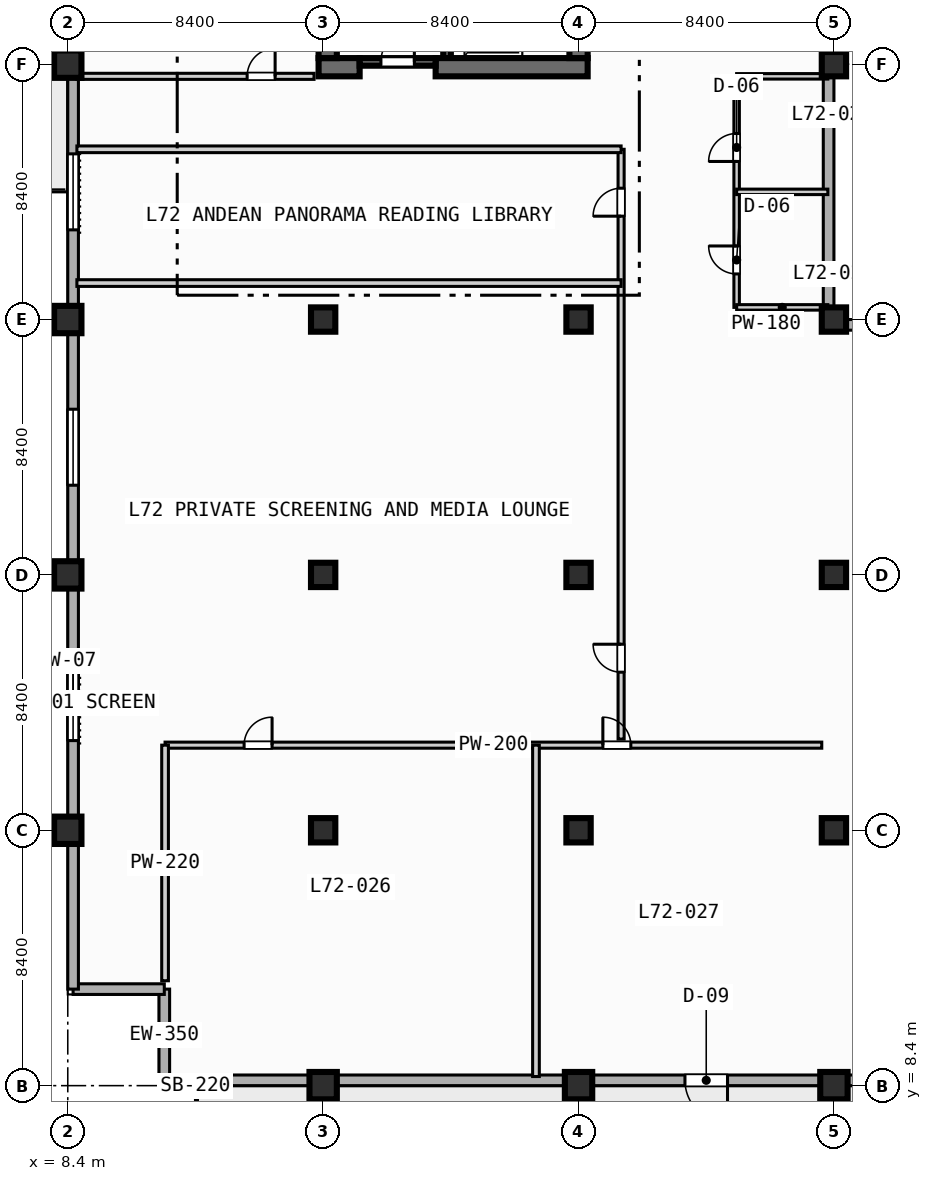
"""IFC4 building model, lengths in metres.
Left out: names, types, materials, properties, quantities, classifications, styles, units other than length and angle.
Written with IfcOpenShell. Run it as: python <this file> out.ifc"""

import sys

from ifc_helpers import new_model, si_unit, direction, frame, frame_2d, origin, origin_2d, place, context, subcontext, project, spatial, rectangle, extrude, element, fill, save


model = new_model("IFC4")
c1 = context("Model", 3, precision=1e-05, world=origin(), true_north=direction((0.0, 1.0)))
c2 = subcontext(c1, "Body", "Model", "MODEL_VIEW")
j1 = project(units=[si_unit("LENGTHUNIT", "METRE"), si_unit("PLANEANGLEUNIT", "RADIAN")], contexts=[c1])
p1 = place(None, origin())
s1 = spatial("IfcSite", under=j1, at=p1, CompositionType="ELEMENT")
p2 = place(p1, origin())
s2 = spatial("IfcBuilding", under=s1, at=p2, CompositionType="ELEMENT")
p3 = place(p2, frame((0.0, 0.0, 290.4)))
s3 = spatial("IfcBuildingStorey", under=s2, at=p3, CompositionType="ELEMENT", Elevation=290.4)
p4 = place(p3, frame((20.875, 42.2, 0.0), z_axis=(0.0, 0.0, 1.0), x_axis=(0.0, 1.0, 0.0)))
e1 = element("IfcWall", 1, at=p4, inside=s3, PredefinedType="SOLIDWALL", context=c2, shape_type="SweptSolid", body=[
    extrude(rectangle(XDim=8.05, YDim=0.25, at=frame_2d((4.025, 0.0))), origin(), (0.0, 0.0, 1.0), 4.05),
])
p5 = place(p3, frame((16.65, 41.9, 0.0), z_axis=(0.0, 0.0, 1.0), x_axis=(1.0, 0.0, 0.0)))
e2 = element("IfcWall", 2, at=p5, inside=s3, PredefinedType="SHEAR", context=c2, shape_type="SweptSolid", body=[
    extrude(rectangle(XDim=1.35, YDim=0.6, at=frame_2d((0.675, 0.0))), origin(), (0.0, 0.0, 1.0), 4.05),
])
p6 = place(p3, frame((20.5, 41.9, 0.0), z_axis=(0.0, 0.0, 1.0), x_axis=(1.0, 0.0, 0.0)))
e3 = element("IfcWall", 3, at=p6, inside=s3, PredefinedType="SHEAR", context=c2, shape_type="SweptSolid", body=[
    extrude(rectangle(XDim=5.0, YDim=0.6, at=frame_2d((2.5, 0.0))), origin(), (0.0, 0.0, 1.0), 4.05),
])
p7 = place(p3, frame((16.95, 42.2, 0.0), z_axis=(0.0, 0.0, 1.0), x_axis=(0.0, 1.0, 0.0)))
e4 = element("IfcWall", 4, at=p7, inside=s3, PredefinedType="SHEAR", context=c2, shape_type="SweptSolid", body=[
    extrude(rectangle(XDim=16.35, YDim=0.6, at=frame_2d((8.175, 0.0))), origin(), (0.0, 0.0, 1.0), 4.05),
])
p8 = place(p3, frame((25.2, 42.2, 0.0), z_axis=(0.0, 0.0, 1.0), x_axis=(0.0, 1.0, 0.0)))
e5 = element("IfcWall", 5, at=p8, inside=s3, PredefinedType="SHEAR", context=c2, shape_type="SweptSolid", body=[
    extrude(rectangle(XDim=8.6, YDim=0.6, at=frame_2d((4.3, 0.0))), origin(), (0.0, 0.0, 1.0), 4.05),
])
for number, where, z_axis, x_axis in (
    (6, (8.4, 16.8, 0.0), (0.0, 0.0, 1.0), (1.0, 0.0, 0.0)),
    (7, (8.4, 25.2, 0.0), (0.0, 0.0, 1.0), (1.0, 0.0, 0.0)),
    (8, (8.4, 33.6, 0.0), (0.0, 0.0, 1.0), (1.0, 0.0, 0.0)),
    (9, (8.4, 42.0, 0.0), (0.0, 0.0, 1.0), (1.0, 0.0, 0.0)),
    (10, (16.8, 8.4, 0.0), (0.0, 0.0, 1.0), (1.0, 0.0, 0.0)),
):
    element("IfcColumn", number, at=place(p3, frame(where, z_axis=z_axis, x_axis=x_axis)), inside=s3, PredefinedType="COLUMN", context=c2, shape_type="SweptSolid", body=[
        extrude(rectangle(XDim=0.9, YDim=0.9, at=origin_2d()), origin(), (0.0, 0.0, 1.0), 4.4),
    ])
for number, where, z_axis, x_axis in (
    (11, (16.8, 16.8, 0.0), (0.0, 0.0, 1.0), (1.0, 0.0, 0.0)),
    (12, (16.8, 25.2, 0.0), (0.0, 0.0, 1.0), (1.0, 0.0, 0.0)),
    (13, (16.8, 33.6, 0.0), (0.0, 0.0, 1.0), (1.0, 0.0, 0.0)),
):
    element("IfcColumn", number, at=place(p3, frame(where, z_axis=z_axis, x_axis=x_axis)), inside=s3, PredefinedType="COLUMN", context=c2, shape_type="SweptSolid", body=[
        extrude(rectangle(XDim=0.8, YDim=0.8, at=origin_2d()), origin(), (0.0, 0.0, 1.0), 4.4),
    ])
p9 = place(p3, frame((25.2, 8.4, 0.0), z_axis=(0.0, 0.0, 1.0), x_axis=(1.0, 0.0, 0.0)))
e14 = element("IfcColumn", 14, at=p9, inside=s3, PredefinedType="COLUMN", context=c2, shape_type="SweptSolid", body=[
    extrude(rectangle(XDim=0.9, YDim=0.9, at=origin_2d()), origin(), (0.0, 0.0, 1.0), 4.4),
])
for number, where, z_axis, x_axis in (
    (15, (25.2, 16.8, 0.0), (0.0, 0.0, 1.0), (1.0, 0.0, 0.0)),
    (16, (25.2, 25.2, 0.0), (0.0, 0.0, 1.0), (1.0, 0.0, 0.0)),
    (17, (25.2, 33.6, 0.0), (0.0, 0.0, 1.0), (1.0, 0.0, 0.0)),
):
    element("IfcColumn", number, at=place(p3, frame(where, z_axis=z_axis, x_axis=x_axis)), inside=s3, PredefinedType="COLUMN", context=c2, shape_type="SweptSolid", body=[
        extrude(rectangle(XDim=0.8, YDim=0.8, at=origin_2d()), origin(), (0.0, 0.0, 1.0), 4.4),
    ])
p10 = place(p3, frame((33.6, 8.4, 0.0), z_axis=(0.0, 0.0, 1.0), x_axis=(1.0, 0.0, 0.0)))
e18 = element("IfcColumn", 18, at=p10, inside=s3, PredefinedType="COLUMN", context=c2, shape_type="SweptSolid", body=[
    extrude(rectangle(XDim=0.9, YDim=0.9, at=origin_2d()), origin(), (0.0, 0.0, 1.0), 4.4),
])
for number, where, z_axis, x_axis in (
    (19, (33.6, 16.8, 0.0), (0.0, 0.0, 1.0), (1.0, 0.0, 0.0)),
    (20, (33.6, 25.2, 0.0), (0.0, 0.0, 1.0), (1.0, 0.0, 0.0)),
    (21, (33.6, 33.6, 0.0), (0.0, 0.0, 1.0), (1.0, 0.0, 0.0)),
    (22, (33.6, 42.0, 0.0), (0.0, 0.0, 1.0), (1.0, 0.0, 0.0)),
):
    element("IfcColumn", number, at=place(p3, frame(where, z_axis=z_axis, x_axis=x_axis)), inside=s3, PredefinedType="COLUMN", context=c2, shape_type="SweptSolid", body=[
        extrude(rectangle(XDim=0.8, YDim=0.8, at=origin_2d()), origin(), (0.0, 0.0, 1.0), 4.4),
    ])
for number, where, z_axis, x_axis in (
    (23, (11.575, 8.575, 0.0), (0.0, 0.0, 1.0), (0.0, 1.0, 0.0)),
    (24, (11.575, 11.575, 0.0), (0.0, 0.0, 1.0), (-1.0, 0.0, 0.0)),
):
    element("IfcWall", number, at=place(p3, frame(where, z_axis=z_axis, x_axis=x_axis)), inside=s3, PredefinedType="STANDARD", context=c2, shape_type="SweptSolid", body=[
        extrude(rectangle(XDim=3.0, YDim=0.35, at=frame_2d((1.5, 0.0))), origin(), (0.0, 0.0, 1.0), 4.05),
    ])
p11 = place(p3, frame((8.575, 11.575, 0.0), z_axis=(0.0, 0.0, 1.0), x_axis=(0.0, 1.0, 0.0)))
e25 = element("IfcWall", 25, at=p11, inside=s3, PredefinedType="STANDARD", context=c2, shape_type="SweptSolid", body=[
    extrude(rectangle(XDim=60.85, YDim=0.35, at=frame_2d((30.425, 0.0))), origin(), (0.0, 0.0, 1.0), 4.05),
])
p12 = place(p11, frame((33.925, 0.0, 0.0)))
e26 = element("IfcOpeningElement", 26, at=p12, cuts=e25, PredefinedType="OPENING", context=c2, shape_type="SweptSolid", body=[
    extrude(rectangle(XDim=1.4, YDim=2.2, at=frame_2d((0.7, 1.1))), frame((0.0, 0.185, 0.0), z_axis=(0.0, -1.0, 0.0), x_axis=(1.0, 0.0, 0.0)), (0.0, 0.0, 1.0), 0.37),
])
p13 = place(p11, frame((8.175, 0.0, 0.85)))
e27 = element("IfcOpeningElement", 27, at=p13, cuts=e25, PredefinedType="OPENING", context=c2, shape_type="SweptSolid", body=[
    extrude(rectangle(XDim=2.5, YDim=2.2, at=frame_2d((1.25, 1.1))), frame((0.0, 0.185, 0.0), z_axis=(0.0, -1.0, 0.0), x_axis=(1.0, 0.0, 0.0)), (0.0, 0.0, 1.0), 0.37),
])
p14 = place(p11, frame((16.575, 0.0, 0.85)))
e28 = element("IfcOpeningElement", 28, at=p14, cuts=e25, PredefinedType="OPENING", context=c2, shape_type="SweptSolid", body=[
    extrude(rectangle(XDim=2.5, YDim=2.2, at=frame_2d((1.25, 1.1))), frame((0.0, 0.185, 0.0), z_axis=(0.0, -1.0, 0.0), x_axis=(1.0, 0.0, 0.0)), (0.0, 0.0, 1.0), 0.37),
])
p15 = place(p11, frame((24.975, 0.0, 0.85)))
e29 = element("IfcOpeningElement", 29, at=p15, cuts=e25, PredefinedType="OPENING", context=c2, shape_type="SweptSolid", body=[
    extrude(rectangle(XDim=2.5, YDim=2.2, at=frame_2d((1.25, 1.1))), frame((0.0, 0.185, 0.0), z_axis=(0.0, -1.0, 0.0), x_axis=(1.0, 0.0, 0.0)), (0.0, 0.0, 1.0), 0.37),
])
p16 = place(p11, frame((41.775, 0.0, 0.85)))
e30 = element("IfcOpeningElement", 30, at=p16, cuts=e25, PredefinedType="OPENING", context=c2, shape_type="SweptSolid", body=[
    extrude(rectangle(XDim=2.5, YDim=2.2, at=frame_2d((1.25, 1.1))), frame((0.0, 0.185, 0.0), z_axis=(0.0, -1.0, 0.0), x_axis=(1.0, 0.0, 0.0)), (0.0, 0.0, 1.0), 0.37),
])
p17 = place(p3, frame((33.425, 72.425, 0.0), z_axis=(0.0, 0.0, 1.0), x_axis=(0.0, -1.0, 0.0)))
e31 = element("IfcWall", 31, at=p17, inside=s3, PredefinedType="STANDARD", context=c2, shape_type="SweptSolid", body=[
    extrude(rectangle(XDim=39.0, YDim=0.35, at=frame_2d((19.5, 0.0))), origin(), (0.0, 0.0, 1.0), 4.05),
])
p18 = place(p3, frame((33.425, 33.425, 0.0), z_axis=(0.0, 0.0, 1.0), x_axis=(1.0, 0.0, 0.0)))
e32 = element("IfcWall", 32, at=p18, inside=s3, PredefinedType="STANDARD", context=c2, shape_type="SweptSolid", body=[
    extrude(rectangle(XDim=30.6, YDim=0.35, at=frame_2d((15.3, 0.0))), origin(), (0.0, 0.0, 1.0), 4.05),
])
p19 = place(p18, frame((12.075, 0.0, 0.0)))
e33 = element("IfcOpeningElement", 33, at=p19, cuts=e32, PredefinedType="OPENING", context=c2, shape_type="SweptSolid", body=[
    extrude(rectangle(XDim=1.4, YDim=2.2, at=frame_2d((0.7, 1.1))), frame((0.0, 0.185, 0.0), z_axis=(0.0, -1.0, 0.0), x_axis=(1.0, 0.0, 0.0)), (0.0, 0.0, 1.0), 0.37),
])
p20 = place(p3, frame((64.025, 8.575, 0.0), z_axis=(0.0, 0.0, 1.0), x_axis=(-1.0, 0.0, 0.0)))
e34 = element("IfcWall", 34, at=p20, inside=s3, PredefinedType="STANDARD", context=c2, shape_type="SweptSolid", body=[
    extrude(rectangle(XDim=52.45, YDim=0.35, at=frame_2d((26.225, 0.0))), origin(), (0.0, 0.0, 1.0), 4.05),
])
p21 = place(p20, frame((33.925, 0.0, 0.0)))
e35 = element("IfcOpeningElement", 35, at=p21, cuts=e34, PredefinedType="OPENING", context=c2, shape_type="SweptSolid", body=[
    extrude(rectangle(XDim=1.4, YDim=2.2, at=frame_2d((0.7, 1.1))), frame((0.0, 0.185, 0.0), z_axis=(0.0, -1.0, 0.0), x_axis=(1.0, 0.0, 0.0)), (0.0, 0.0, 1.0), 0.37),
])
p22 = place(p20, frame((16.575, 0.0, 0.85)))
e36 = element("IfcOpeningElement", 36, at=p22, cuts=e34, PredefinedType="OPENING", context=c2, shape_type="SweptSolid", body=[
    extrude(rectangle(XDim=2.5, YDim=2.2, at=frame_2d((1.25, 1.1))), frame((0.0, 0.185, 0.0), z_axis=(0.0, -1.0, 0.0), x_axis=(1.0, 0.0, 0.0)), (0.0, 0.0, 1.0), 0.37),
])
p23 = place(p20, frame((8.175, 0.0, 0.85)))
e37 = element("IfcOpeningElement", 37, at=p23, cuts=e34, PredefinedType="OPENING", context=c2, shape_type="SweptSolid", body=[
    extrude(rectangle(XDim=2.5, YDim=2.2, at=frame_2d((1.25, 1.1))), frame((0.0, 0.185, 0.0), z_axis=(0.0, -1.0, 0.0), x_axis=(1.0, 0.0, 0.0)), (0.0, 0.0, 1.0), 0.37),
])
p24 = place(p3, frame((18.0, 42.075, 0.0), z_axis=(0.0, 0.0, 1.0), x_axis=(1.0, 0.0, 0.0)))
e38 = element("IfcWall", 38, at=p24, inside=s3, PredefinedType="SOLIDWALL", context=c2, shape_type="SweptSolid", body=[
    extrude(rectangle(XDim=2.5, YDim=0.25, at=frame_2d((1.25, 0.0))), origin(), (0.0, 0.0, 1.0), 4.05),
])
p25 = place(p24, frame((0.7, 0.0, 0.0)))
e39 = element("IfcOpeningElement", 39, at=p25, cuts=e38, PredefinedType="OPENING", context=c2, shape_type="SweptSolid", body=[
    extrude(rectangle(XDim=1.1, YDim=2.15, at=frame_2d((0.55, 1.075))), frame((0.0, 0.135, 0.0), z_axis=(0.0, -1.0, 0.0), x_axis=(1.0, 0.0, 0.0)), (0.0, 0.0, 1.0), 0.27),
])
p26 = place(p3, frame((30.4, 34.0, 0.0), z_axis=(0.0, 0.0, 1.0), x_axis=(0.0, 1.0, 0.0)))
e40 = element("IfcWall", 40, at=p26, inside=s3, PredefinedType="PLUMBINGWALL", context=c2, shape_type="SweptSolid", body=[
    extrude(rectangle(XDim=7.6, YDim=0.18, at=frame_2d((3.8, 0.0))), origin(), (0.0, 0.0, 1.0), 4.05),
])
p27 = place(p26, frame((1.1, 0.0, 0.0)))
e41 = element("IfcOpeningElement", 41, at=p27, cuts=e40, PredefinedType="OPENING", context=c2, shape_type="SweptSolid", body=[
    extrude(rectangle(XDim=0.92, YDim=2.1, at=frame_2d((0.46, 1.05))), frame((0.0, 0.1, 0.0), z_axis=(0.0, -1.0, 0.0), x_axis=(1.0, 0.0, 0.0)), (0.0, 0.0, 1.0), 0.2),
])
p28 = place(p26, frame((4.8, 0.0, 0.0)))
e42 = element("IfcOpeningElement", 42, at=p28, cuts=e40, PredefinedType="OPENING", context=c2, shape_type="SweptSolid", body=[
    extrude(rectangle(XDim=0.92, YDim=2.1, at=frame_2d((0.46, 1.05))), frame((0.0, 0.1, 0.0), z_axis=(0.0, -1.0, 0.0), x_axis=(1.0, 0.0, 0.0)), (0.0, 0.0, 1.0), 0.2),
])
for number, where, z_axis, x_axis in (
    (43, (30.4, 34.0, 0.0), (0.0, 0.0, 1.0), (1.0, 0.0, 0.0)),
    (44, (30.4, 37.8, 0.0), (0.0, 0.0, 1.0), (1.0, 0.0, 0.0)),
    (45, (30.4, 41.6, 0.0), (0.0, 0.0, 1.0), (1.0, 0.0, 0.0)),
):
    element("IfcWall", number, at=place(p3, frame(where, z_axis=z_axis, x_axis=x_axis)), inside=s3, PredefinedType="PLUMBINGWALL", context=c2, shape_type="SweptSolid", body=[
        extrude(rectangle(XDim=3.0, YDim=0.18, at=frame_2d((1.5, 0.0))), origin(), (0.0, 0.0, 1.0), 4.05),
    ])
p29 = place(p3, frame((8.7, 41.6, 0.0), z_axis=(0.0, 0.0, 1.0), x_axis=(1.0, 0.0, 0.0)))
e46 = element("IfcWall", 46, at=p29, inside=s3, PredefinedType="PARTITIONING", context=c2, shape_type="SweptSolid", body=[
    extrude(rectangle(XDim=7.8, YDim=0.2, at=frame_2d((3.9, 0.0))), origin(), (0.0, 0.0, 1.0), 4.05),
])
p30 = place(p29, frame((5.6, 0.0, 0.0)))
e47 = element("IfcOpeningElement", 47, at=p30, cuts=e46, PredefinedType="OPENING", context=c2, shape_type="SweptSolid", body=[
    extrude(rectangle(XDim=0.92, YDim=2.1, at=frame_2d((0.46, 1.05))), frame((0.0, 0.11, 0.0), z_axis=(0.0, -1.0, 0.0), x_axis=(1.0, 0.0, 0.0)), (0.0, 0.0, 1.0), 0.22),
])
p31 = place(p3, frame((11.6, 19.6, 0.0), z_axis=(0.0, 0.0, 1.0), x_axis=(1.0, 0.0, 0.0)))
e48 = element("IfcWall", 48, at=p31, inside=s3, PredefinedType="PARTITIONING", context=c2, shape_type="SweptSolid", body=[
    extrude(rectangle(XDim=21.6, YDim=0.2, at=frame_2d((10.8, 0.0))), origin(), (0.0, 0.0, 1.0), 4.05),
])
p32 = place(p31, frame((2.6, 0.0, 0.0)))
e49 = element("IfcOpeningElement", 49, at=p32, cuts=e48, PredefinedType="OPENING", context=c2, shape_type="SweptSolid", body=[
    extrude(rectangle(XDim=0.92, YDim=2.1, at=frame_2d((0.46, 1.05))), frame((0.0, 0.11, 0.0), z_axis=(0.0, -1.0, 0.0), x_axis=(1.0, 0.0, 0.0)), (0.0, 0.0, 1.0), 0.22),
])
p33 = place(p31, frame((14.4, 0.0, 0.0)))
e50 = element("IfcOpeningElement", 50, at=p33, cuts=e48, PredefinedType="OPENING", context=c2, shape_type="SweptSolid", body=[
    extrude(rectangle(XDim=0.92, YDim=2.1, at=frame_2d((0.46, 1.05))), frame((0.0, 0.11, 0.0), z_axis=(0.0, -1.0, 0.0), x_axis=(1.0, 0.0, 0.0)), (0.0, 0.0, 1.0), 0.22),
])
p34 = place(p3, frame((11.6, 11.85, 0.0), z_axis=(0.0, 0.0, 1.0), x_axis=(0.0, 1.0, 0.0)))
e51 = element("IfcWall", 51, at=p34, inside=s3, PredefinedType="PARTITIONING", context=c2, shape_type="SweptSolid", body=[
    extrude(rectangle(XDim=7.75, YDim=0.22, at=frame_2d((3.875, 0.0))), origin(), (0.0, 0.0, 1.0), 4.05),
])
p35 = place(p3, frame((23.8, 8.7, 0.0), z_axis=(0.0, 0.0, 1.0), x_axis=(0.0, 1.0, 0.0)))
e52 = element("IfcWall", 52, at=p35, inside=s3, PredefinedType="PARTITIONING", context=c2, shape_type="SweptSolid", body=[
    extrude(rectangle(XDim=10.9, YDim=0.22, at=frame_2d((5.45, 0.0))), origin(), (0.0, 0.0, 1.0), 4.05),
])
p36 = place(p3, frame((26.6, 19.8, 0.0), z_axis=(0.0, 0.0, 1.0), x_axis=(0.0, 1.0, 0.0)))
e53 = element("IfcWall", 53, at=p36, inside=s3, PredefinedType="PARTITIONING", context=c2, shape_type="SweptSolid", body=[
    extrude(rectangle(XDim=19.4, YDim=0.2, at=frame_2d((9.7, 0.0))), origin(), (0.0, 0.0, 1.0), 4.05),
])
p37 = place(p36, frame((2.2, 0.0, 0.0)))
e54 = element("IfcOpeningElement", 54, at=p37, cuts=e53, PredefinedType="OPENING", context=c2, shape_type="SweptSolid", body=[
    extrude(rectangle(XDim=0.92, YDim=2.1, at=frame_2d((0.46, 1.05))), frame((0.0, 0.11, 0.0), z_axis=(0.0, -1.0, 0.0), x_axis=(1.0, 0.0, 0.0)), (0.0, 0.0, 1.0), 0.22),
])
p38 = place(p36, frame((17.2, 0.0, 0.0)))
e55 = element("IfcOpeningElement", 55, at=p38, cuts=e53, PredefinedType="OPENING", context=c2, shape_type="SweptSolid", body=[
    extrude(rectangle(XDim=0.92, YDim=2.1, at=frame_2d((0.46, 1.05))), frame((0.0, 0.11, 0.0), z_axis=(0.0, -1.0, 0.0), x_axis=(1.0, 0.0, 0.0)), (0.0, 0.0, 1.0), 0.22),
])
for number, where, z_axis, x_axis in (
    (56, (8.7, 34.8, 0.0), (0.0, 0.0, 1.0), (1.0, 0.0, 0.0)),
    (57, (8.7, 39.2, 0.0), (0.0, 0.0, 1.0), (1.0, 0.0, 0.0)),
):
    element("IfcWall", number, at=place(p3, frame(where, z_axis=z_axis, x_axis=x_axis)), inside=s3, PredefinedType="PARTITIONING", context=c2, shape_type="SweptSolid", body=[
        extrude(rectangle(XDim=17.9, YDim=0.22, at=frame_2d((8.95, 0.0))), origin(), (0.0, 0.0, 1.0), 4.05),
    ])
p39 = place(p13, origin())
e58 = element("IfcWindow", 58, at=p39, inside=s3, PartitioningType="SINGLE_PANEL", PredefinedType="WINDOW", context=c2, shape_type="SweptSolid", body=[
    extrude(rectangle(XDim=2.5, YDim=2.2, at=frame_2d((1.25, 1.1))), frame((0.0, 0.03, 0.0), z_axis=(0.0, -1.0, 0.0), x_axis=(1.0, 0.0, 0.0)), (0.0, 0.0, 1.0), 0.06),
])
fill(e27, e58)
p40 = place(p14, origin())
e59 = element("IfcWindow", 59, at=p40, inside=s3, PartitioningType="SINGLE_PANEL", PredefinedType="WINDOW", context=c2, shape_type="SweptSolid", body=[
    extrude(rectangle(XDim=2.5, YDim=2.2, at=frame_2d((1.25, 1.1))), frame((0.0, 0.03, 0.0), z_axis=(0.0, -1.0, 0.0), x_axis=(1.0, 0.0, 0.0)), (0.0, 0.0, 1.0), 0.06),
])
fill(e28, e59)
p41 = place(p15, origin())
e60 = element("IfcWindow", 60, at=p41, inside=s3, PartitioningType="SINGLE_PANEL", PredefinedType="WINDOW", context=c2, shape_type="SweptSolid", body=[
    extrude(rectangle(XDim=2.5, YDim=2.2, at=frame_2d((1.25, 1.1))), frame((0.0, 0.03, 0.0), z_axis=(0.0, -1.0, 0.0), x_axis=(1.0, 0.0, 0.0)), (0.0, 0.0, 1.0), 0.06),
])
fill(e29, e60)
p42 = place(p21, origin())
e61 = element("IfcDoor", 61, at=p42, inside=s3, OperationType="SINGLE_SWING_LEFT", PredefinedType="DOOR", context=c2, shape_type="SweptSolid", body=[
    extrude(rectangle(XDim=1.4, YDim=2.2, at=frame_2d((0.7, 1.1))), frame((0.0, 0.025, 0.0), z_axis=(0.0, -1.0, 0.0), x_axis=(1.0, 0.0, 0.0)), (0.0, 0.0, 1.0), 0.05),
])
fill(e35, e61)
p43 = place(p25, origin())
e62 = element("IfcDoor", 62, at=p43, inside=s3, OperationType="SINGLE_SWING_RIGHT", PredefinedType="DOOR", context=c2, shape_type="SweptSolid", body=[
    extrude(rectangle(XDim=1.1, YDim=2.15, at=frame_2d((0.55, 1.075))), frame((0.0, 0.025, 0.0), z_axis=(0.0, -1.0, 0.0), x_axis=(1.0, 0.0, 0.0)), (0.0, 0.0, 1.0), 0.05),
])
fill(e39, e62)
p44 = place(p27, origin())
e63 = element("IfcDoor", 63, at=p44, inside=s3, OperationType="SINGLE_SWING_RIGHT", PredefinedType="DOOR", context=c2, shape_type="SweptSolid", body=[
    extrude(rectangle(XDim=0.92, YDim=2.1, at=frame_2d((0.46, 1.05))), frame((0.0, 0.025, 0.0), z_axis=(0.0, -1.0, 0.0), x_axis=(1.0, 0.0, 0.0)), (0.0, 0.0, 1.0), 0.05),
])
fill(e41, e63)
p45 = place(p28, origin())
e64 = element("IfcDoor", 64, at=p45, inside=s3, OperationType="SINGLE_SWING_LEFT", PredefinedType="DOOR", context=c2, shape_type="SweptSolid", body=[
    extrude(rectangle(XDim=0.92, YDim=2.1, at=frame_2d((0.46, 1.05))), frame((0.0, 0.025, 0.0), z_axis=(0.0, -1.0, 0.0), x_axis=(1.0, 0.0, 0.0)), (0.0, 0.0, 1.0), 0.05),
])
fill(e42, e64)
p46 = place(p30, origin())
e65 = element("IfcDoor", 65, at=p46, inside=s3, OperationType="SINGLE_SWING_RIGHT", PredefinedType="DOOR", context=c2, shape_type="SweptSolid", body=[
    extrude(rectangle(XDim=0.92, YDim=2.1, at=frame_2d((0.46, 1.05))), frame((0.0, 0.025, 0.0), z_axis=(0.0, -1.0, 0.0), x_axis=(1.0, 0.0, 0.0)), (0.0, 0.0, 1.0), 0.05),
])
fill(e47, e65)
p47 = place(p32, origin())
e66 = element("IfcDoor", 66, at=p47, inside=s3, OperationType="SINGLE_SWING_RIGHT", PredefinedType="DOOR", context=c2, shape_type="SweptSolid", body=[
    extrude(rectangle(XDim=0.92, YDim=2.1, at=frame_2d((0.46, 1.05))), frame((0.0, 0.025, 0.0), z_axis=(0.0, -1.0, 0.0), x_axis=(1.0, 0.0, 0.0)), (0.0, 0.0, 1.0), 0.05),
])
fill(e49, e66)
p48 = place(p33, origin())
e67 = element("IfcDoor", 67, at=p48, inside=s3, OperationType="SINGLE_SWING_LEFT", PredefinedType="DOOR", context=c2, shape_type="SweptSolid", body=[
    extrude(rectangle(XDim=0.92, YDim=2.1, at=frame_2d((0.46, 1.05))), frame((0.0, 0.025, 0.0), z_axis=(0.0, -1.0, 0.0), x_axis=(1.0, 0.0, 0.0)), (0.0, 0.0, 1.0), 0.05),
])
fill(e50, e67)
p49 = place(p37, origin())
e68 = element("IfcDoor", 68, at=p49, inside=s3, OperationType="SINGLE_SWING_RIGHT", PredefinedType="DOOR", context=c2, shape_type="SweptSolid", body=[
    extrude(rectangle(XDim=0.92, YDim=2.1, at=frame_2d((0.46, 1.05))), frame((0.0, 0.025, 0.0), z_axis=(0.0, -1.0, 0.0), x_axis=(1.0, 0.0, 0.0)), (0.0, 0.0, 1.0), 0.05),
])
fill(e54, e68)
p50 = place(p38, origin())
e69 = element("IfcDoor", 69, at=p50, inside=s3, OperationType="SINGLE_SWING_LEFT", PredefinedType="DOOR", context=c2, shape_type="SweptSolid", body=[
    extrude(rectangle(XDim=0.92, YDim=2.1, at=frame_2d((0.46, 1.05))), frame((0.0, 0.025, 0.0), z_axis=(0.0, -1.0, 0.0), x_axis=(1.0, 0.0, 0.0)), (0.0, 0.0, 1.0), 0.05),
])
fill(e55, e69)
save(model, sys.argv[1])
